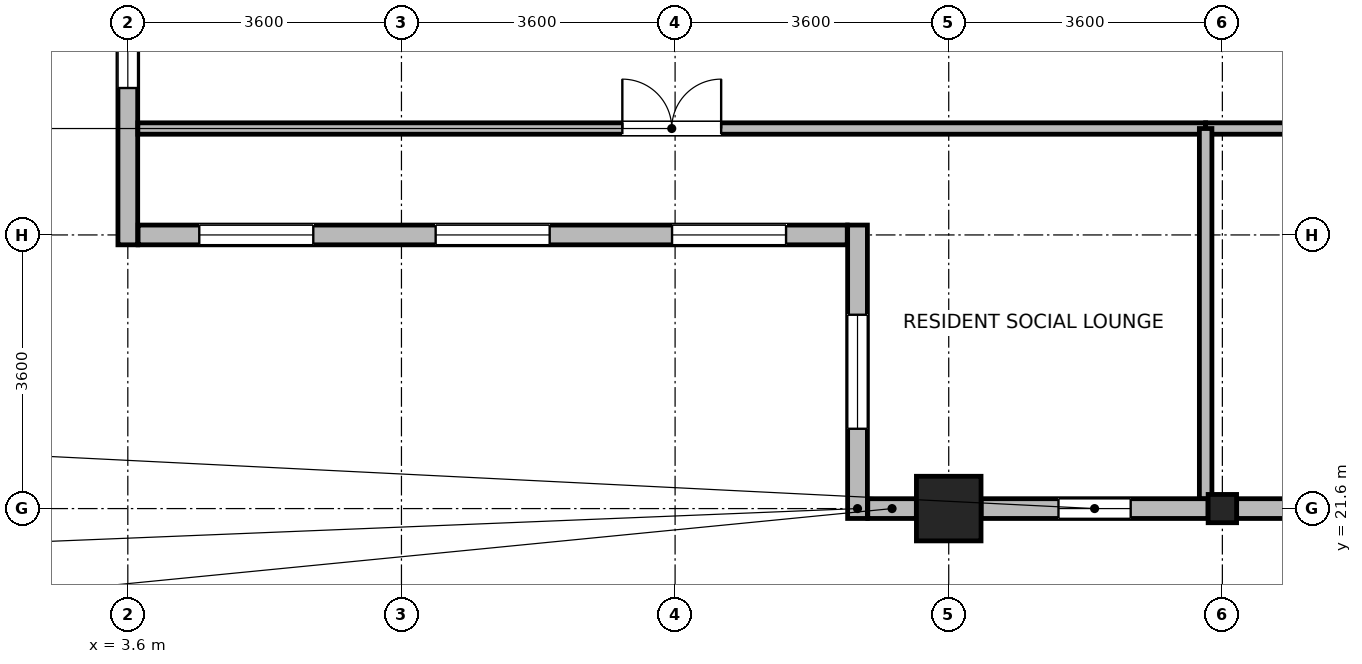
"""IFC4 building model, lengths in metres.
Left out: names, types, materials, properties, quantities, classifications, styles, units other than length and angle.
Written with IfcOpenShell. Run it as: python <this file> out.ifc"""

import sys

from ifc_helpers import new_model, si_unit, direction, frame, frame_2d, origin, origin_2d, place, context, subcontext, project, spatial, rectangle, i_section, extrude, source, transform, mapped, element, fill, save


model = new_model("IFC4")
c1 = context("Model", 3, precision=1e-05, world=origin(), true_north=direction((0.0, 1.0)))
c2 = subcontext(c1, "Body", "Model", "MODEL_VIEW")
j1 = project(units=[si_unit("LENGTHUNIT", "METRE"), si_unit("PLANEANGLEUNIT", "RADIAN")], contexts=[c1])
p1 = place(None, origin())
s1 = spatial("IfcSite", under=j1, at=p1, CompositionType="ELEMENT")
p2 = place(p1, origin())
s2 = spatial("IfcBuilding", under=s1, at=p2, CompositionType="ELEMENT")
p3 = place(p2, frame((0.0, 0.0, 290.6)))
s3 = spatial("IfcBuildingStorey", under=s2, at=p3, CompositionType="ELEMENT", Elevation=290.6)
m1 = source(origin(), c2, "Body", "SweptSolid", [
    extrude(rectangle(XDim=0.85, YDim=0.85, at=origin_2d()), origin(), (0.0, 0.0, 1.0), 3.7),
])
p4 = place(p3, frame((14.4, 21.6, 0.0), z_axis=(0.0, 0.0, 1.0), x_axis=(1.0, 0.0, 0.0)))
e1 = element("IfcColumn", 1, at=p4, inside=s3, PredefinedType="COLUMN", context=c2, shape_type="MappedRepresentation", body=[
    mapped(m1, transform((0.0, 0.0, 0.0), x_axis=(1.0, 0.0, 0.0), y_axis=(0.0, 1.0, 0.0), z_axis=(0.0, 0.0, 1.0), scale=1.0)),
])
m2 = source(origin(), c2, "Body", "SweptSolid", [
    extrude(i_section(OverallWidth=0.374, OverallDepth=0.372, WebThickness=0.015, FlangeThickness=0.026, FilletRadius=0.015, at=origin_2d()), origin(), (0.0, 0.0, 1.0), 3.7),
])
p5 = place(p3, frame((18.0, 21.6, 0.0), z_axis=(0.0, 0.0, 1.0), x_axis=(1.0, 0.0, 0.0)))
e2 = element("IfcColumn", 2, at=p5, inside=s3, PredefinedType="COLUMN", context=c2, shape_type="MappedRepresentation", body=[
    mapped(m2, transform((0.0, 0.0, 0.0), x_axis=(1.0, 0.0, 0.0), y_axis=(0.0, 1.0, 0.0), z_axis=(0.0, 0.0, 1.0), scale=1.0)),
])
p6 = place(p3, frame((13.974, 21.6, 0.0), z_axis=(0.0, 0.0, 1.0), x_axis=(-1.0, 0.0, 0.0)))
e3 = element("IfcWall", 3, at=p6, inside=s3, PredefinedType="STANDARD", context=c2, shape_type="SweptSolid", body=[
    extrude(rectangle(XDim=0.639, YDim=0.26, at=frame_2d((0.32, 0.0))), origin(), (0.0, 0.0, 1.0), 3.455),
])
p7 = place(p3, frame((17.812, 21.6, 0.0), z_axis=(0.0, 0.0, 1.0), x_axis=(-1.0, 0.0, 0.0)))
e4 = element("IfcWall", 4, at=p7, inside=s3, PredefinedType="STANDARD", context=c2, shape_type="SweptSolid", body=[
    extrude(rectangle(XDim=2.986, YDim=0.26, at=frame_2d((1.493, 0.0))), origin(), (0.0, 0.0, 1.0), 3.055),
])
p8 = place(p7, frame((1.018, 0.0, 0.85)))
e5 = element("IfcOpeningElement", 5, at=p8, cuts=e4, PredefinedType="OPENING", context=c2, shape_type="SweptSolid", body=[
    extrude(rectangle(XDim=0.95, YDim=1.75, at=frame_2d((0.475, 0.875))), frame((0.0, 0.14, 0.0), z_axis=(0.0, -1.0, 0.0), x_axis=(1.0, 0.0, 0.0)), (0.0, 0.0, 1.0), 0.28),
])
p9 = place(p3, frame((21.174, 21.6, 0.0), z_axis=(0.0, 0.0, 1.0), x_axis=(-1.0, 0.0, 0.0)))
e6 = element("IfcWall", 6, at=p9, inside=s3, PredefinedType="STANDARD", context=c2, shape_type="SweptSolid", body=[
    extrude(rectangle(XDim=2.986, YDim=0.26, at=frame_2d((1.493, 0.0))), origin(), (0.0, 0.0, 1.0), 3.055),
])
p10 = place(p9, frame((1.018, 0.0, 0.85)))
e7 = element("IfcOpeningElement", 7, at=p10, cuts=e6, PredefinedType="OPENING", context=c2, shape_type="SweptSolid", body=[
    extrude(rectangle(XDim=0.95, YDim=1.75, at=frame_2d((0.475, 0.875))), frame((0.0, 0.14, 0.0), z_axis=(0.0, -1.0, 0.0), x_axis=(1.0, 0.0, 0.0)), (0.0, 0.0, 1.0), 0.28),
])
p11 = place(p3, frame((3.6, 25.07, 0.0), z_axis=(0.0, 0.0, 1.0), x_axis=(0.0, 1.0, 0.0)))
e8 = element("IfcWall", 8, at=p11, inside=s3, PredefinedType="STANDARD", context=c2, shape_type="SweptSolid", body=[
    extrude(rectangle(XDim=3.393, YDim=0.26, at=frame_2d((1.696, 0.0))), origin(), (0.0, 0.0, 1.0), 3.455),
])
p12 = place(p11, frame((2.063, 0.0, 0.85)))
e9 = element("IfcOpeningElement", 9, at=p12, cuts=e8, PredefinedType="OPENING", context=c2, shape_type="SweptSolid", body=[
    extrude(rectangle(XDim=0.95, YDim=1.75, at=frame_2d((0.475, 0.875))), frame((0.0, 0.14, 0.0), z_axis=(0.0, -1.0, 0.0), x_axis=(1.0, 0.0, 0.0)), (0.0, 0.0, 1.0), 0.28),
])
p13 = place(p3, frame((13.065, 25.2, 0.0), z_axis=(0.0, 0.0, 1.0), x_axis=(-1.0, 0.0, 0.0)))
e10 = element("IfcWall", 10, at=p13, inside=s3, PredefinedType="STANDARD", context=c2, shape_type="SweptSolid", body=[
    extrude(rectangle(XDim=9.33, YDim=0.26, at=frame_2d((4.665, 0.0))), origin(), (0.0, 0.0, 1.0), 3.455),
])
p14 = place(p13, frame((0.805, 0.0, 0.85)))
e11 = element("IfcOpeningElement", 11, at=p14, cuts=e10, PredefinedType="OPENING", context=c2, shape_type="SweptSolid", body=[
    extrude(rectangle(XDim=1.5, YDim=1.85, at=frame_2d((0.75, 0.925))), frame((0.0, 0.14, 0.0), z_axis=(0.0, -1.0, 0.0), x_axis=(1.0, 0.0, 0.0)), (0.0, 0.0, 1.0), 0.28),
])
p15 = place(p13, frame((3.915, 0.0, 0.85)))
e12 = element("IfcOpeningElement", 12, at=p15, cuts=e10, PredefinedType="OPENING", context=c2, shape_type="SweptSolid", body=[
    extrude(rectangle(XDim=1.5, YDim=1.85, at=frame_2d((0.75, 0.925))), frame((0.0, 0.14, 0.0), z_axis=(0.0, -1.0, 0.0), x_axis=(1.0, 0.0, 0.0)), (0.0, 0.0, 1.0), 0.28),
])
p16 = place(p13, frame((7.025, 0.0, 0.85)))
e13 = element("IfcOpeningElement", 13, at=p16, cuts=e10, PredefinedType="OPENING", context=c2, shape_type="SweptSolid", body=[
    extrude(rectangle(XDim=1.5, YDim=1.85, at=frame_2d((0.75, 0.925))), frame((0.0, 0.14, 0.0), z_axis=(0.0, -1.0, 0.0), x_axis=(1.0, 0.0, 0.0)), (0.0, 0.0, 1.0), 0.28),
])
p17 = place(p3, frame((13.2, 21.47, 0.0), z_axis=(0.0, 0.0, 1.0), x_axis=(0.0, 1.0, 0.0)))
e14 = element("IfcWall", 14, at=p17, inside=s3, PredefinedType="STANDARD", context=c2, shape_type="SweptSolid", body=[
    extrude(rectangle(XDim=3.86, YDim=0.26, at=frame_2d((1.93, 0.0))), origin(), (0.0, 0.0, 1.0), 3.455),
])
p18 = place(p17, frame((1.18, 0.0, 0.85)))
e15 = element("IfcOpeningElement", 15, at=p18, cuts=e14, PredefinedType="OPENING", context=c2, shape_type="SweptSolid", body=[
    extrude(rectangle(XDim=1.5, YDim=1.85, at=frame_2d((0.75, 0.925))), frame((0.0, 0.14, 0.0), z_axis=(0.0, -1.0, 0.0), x_axis=(1.0, 0.0, 0.0)), (0.0, 0.0, 1.0), 0.28),
])
p19 = place(p3, frame((3.732, 26.6, 0.0), z_axis=(0.0, 0.0, 1.0), x_axis=(1.0, 0.0, 0.0)))
e16 = element("IfcWall", 16, at=p19, inside=s3, PredefinedType="PARTITIONING", context=c2, shape_type="SweptSolid", body=[
    extrude(rectangle(XDim=14.048, YDim=0.15, at=frame_2d((7.024, 0.0))), origin(), (0.0, 0.0, 1.0), 3.455),
])
p20 = place(p19, frame((6.374, 0.0, 0.0)))
e17 = element("IfcOpeningElement", 17, at=p20, cuts=e16, PredefinedType="OPENING", context=c2, shape_type="SweptSolid", body=[
    extrude(rectangle(XDim=1.3, YDim=2.12, at=frame_2d((0.65, 1.06))), frame((0.0, 0.085, 0.0), z_axis=(0.0, -1.0, 0.0), x_axis=(1.0, 0.0, 0.0)), (0.0, 0.0, 1.0), 0.17),
])
p21 = place(p3, frame((17.78, 26.6, 0.0), z_axis=(0.0, 0.0, 1.0), x_axis=(1.0, 0.0, 0.0)))
e18 = element("IfcWall", 18, at=p21, inside=s3, PredefinedType="PARTITIONING", context=c2, shape_type="SweptSolid", body=[
    extrude(rectangle(XDim=12.94, YDim=0.15, at=frame_2d((6.47, 0.0))), origin(), (0.0, 0.0, 1.0), 3.455),
])
p22 = place(p21, frame((6.02, 0.0, 0.0)))
e19 = element("IfcOpeningElement", 19, at=p22, cuts=e18, PredefinedType="OPENING", context=c2, shape_type="SweptSolid", body=[
    extrude(rectangle(XDim=0.9, YDim=2.08, at=frame_2d((0.45, 1.04))), frame((0.0, 0.085, 0.0), z_axis=(0.0, -1.0, 0.0), x_axis=(1.0, 0.0, 0.0)), (0.0, 0.0, 1.0), 0.17),
])
p23 = place(p3, frame((17.78, 21.732, 0.0), z_axis=(0.0, 0.0, 1.0), x_axis=(0.0, 1.0, 0.0)))
e20 = element("IfcWall", 20, at=p23, inside=s3, PredefinedType="PARTITIONING", context=c2, shape_type="SweptSolid", body=[
    extrude(rectangle(XDim=4.868, YDim=0.165, at=frame_2d((2.434, 0.0))), origin(), (0.0, 0.0, 1.0), 3.455),
])
p24 = place(p8, origin())
e21 = element("IfcWindow", 21, at=p24, inside=s3, PartitioningType="SINGLE_PANEL", PredefinedType="WINDOW", context=c2, shape_type="SweptSolid", body=[
    extrude(rectangle(XDim=0.95, YDim=1.75, at=frame_2d((0.475, 0.875))), frame((0.0, 0.03, 0.0), z_axis=(0.0, -1.0, 0.0), x_axis=(1.0, 0.0, 0.0)), (0.0, 0.0, 1.0), 0.06),
])
fill(e5, e21)
p25 = place(p12, origin())
e22 = element("IfcWindow", 22, at=p25, inside=s3, PartitioningType="SINGLE_PANEL", PredefinedType="WINDOW", context=c2, shape_type="SweptSolid", body=[
    extrude(rectangle(XDim=0.95, YDim=1.75, at=frame_2d((0.475, 0.875))), frame((0.0, 0.03, 0.0), z_axis=(0.0, -1.0, 0.0), x_axis=(1.0, 0.0, 0.0)), (0.0, 0.0, 1.0), 0.06),
])
fill(e9, e22)
p26 = place(p14, origin())
e23 = element("IfcWindow", 23, at=p26, inside=s3, PartitioningType="SINGLE_PANEL", PredefinedType="WINDOW", context=c2, shape_type="SweptSolid", body=[
    extrude(rectangle(XDim=1.5, YDim=1.85, at=frame_2d((0.75, 0.925))), frame((0.0, 0.03, 0.0), z_axis=(0.0, -1.0, 0.0), x_axis=(1.0, 0.0, 0.0)), (0.0, 0.0, 1.0), 0.06),
])
fill(e11, e23)
p27 = place(p15, origin())
e24 = element("IfcWindow", 24, at=p27, inside=s3, PartitioningType="SINGLE_PANEL", PredefinedType="WINDOW", context=c2, shape_type="SweptSolid", body=[
    extrude(rectangle(XDim=1.5, YDim=1.85, at=frame_2d((0.75, 0.925))), frame((0.0, 0.03, 0.0), z_axis=(0.0, -1.0, 0.0), x_axis=(1.0, 0.0, 0.0)), (0.0, 0.0, 1.0), 0.06),
])
fill(e12, e24)
p28 = place(p16, origin())
e25 = element("IfcWindow", 25, at=p28, inside=s3, PartitioningType="SINGLE_PANEL", PredefinedType="WINDOW", context=c2, shape_type="SweptSolid", body=[
    extrude(rectangle(XDim=1.5, YDim=1.85, at=frame_2d((0.75, 0.925))), frame((0.0, 0.03, 0.0), z_axis=(0.0, -1.0, 0.0), x_axis=(1.0, 0.0, 0.0)), (0.0, 0.0, 1.0), 0.06),
])
fill(e13, e25)
p29 = place(p18, origin())
e26 = element("IfcWindow", 26, at=p29, inside=s3, PartitioningType="SINGLE_PANEL", PredefinedType="WINDOW", context=c2, shape_type="SweptSolid", body=[
    extrude(rectangle(XDim=1.5, YDim=1.85, at=frame_2d((0.75, 0.925))), frame((0.0, 0.03, 0.0), z_axis=(0.0, -1.0, 0.0), x_axis=(1.0, 0.0, 0.0)), (0.0, 0.0, 1.0), 0.06),
])
fill(e15, e26)
p30 = place(p20, origin())
e27 = element("IfcDoor", 27, at=p30, inside=s3, OperationType="DOUBLE_DOOR_SINGLE_SWING", PredefinedType="DOOR", context=c2, shape_type="SweptSolid", body=[
    extrude(rectangle(XDim=1.3, YDim=2.12, at=frame_2d((0.65, 1.06))), frame((0.0, 0.025, 0.0), z_axis=(0.0, -1.0, 0.0), x_axis=(1.0, 0.0, 0.0)), (0.0, 0.0, 1.0), 0.05),
])
fill(e17, e27)
save(model, sys.argv[1])
